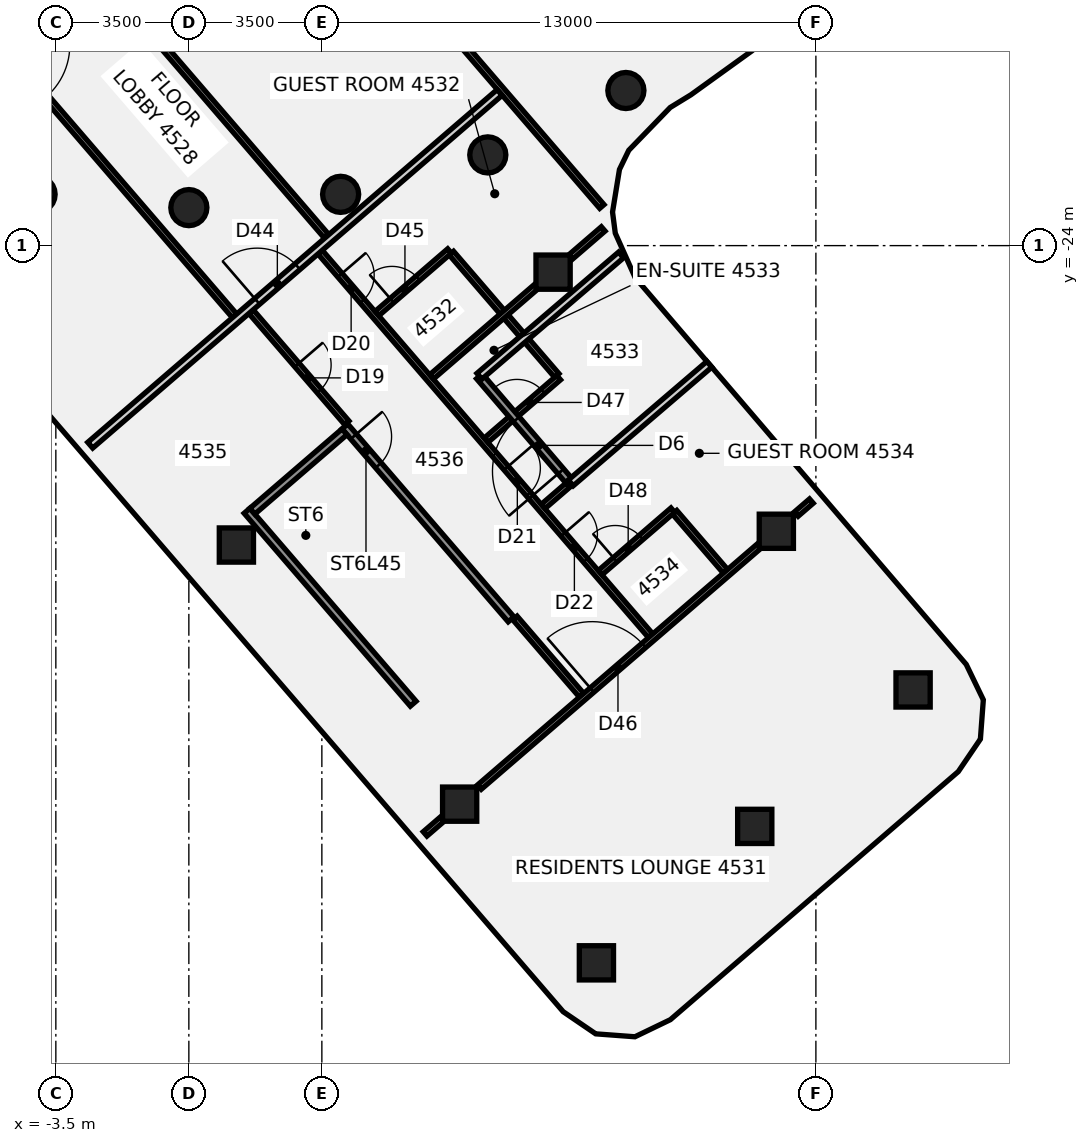
"""IFC4 building model, lengths in metres.
Left out: names, types, materials, properties, quantities, classifications, styles, units other than length and angle.
Written with IfcOpenShell. Run it as: python <this file> out.ifc"""

import sys

from ifc_helpers import new_model, si_unit, direction, frame, frame_2d, origin, origin_2d, place, context, subcontext, project, spatial, polyline, rectangle, circle, outline, extrude, element, fill, save


model = new_model("IFC4")
c1 = context("Model", 3, precision=1e-05, world=origin(), true_north=direction((0.0, 1.0)))
c2 = subcontext(c1, "Body", "Model", "MODEL_VIEW")
j1 = project(units=[si_unit("LENGTHUNIT", "METRE"), si_unit("PLANEANGLEUNIT", "RADIAN")], contexts=[c1])
p1 = place(None, origin())
s1 = spatial("IfcSite", under=j1, at=p1, CompositionType="ELEMENT")
p2 = place(p1, origin())
s2 = spatial("IfcBuilding", under=s1, at=p2, CompositionType="ELEMENT")
p3 = place(p2, frame((0.0, 0.0, 182.5)))
s3 = spatial("IfcBuildingStorey", under=s2, at=p3, CompositionType="ELEMENT", Elevation=182.5)
for number, where, z_axis, x_axis in (
    (1, (-3.994, -22.651, -0.14), (0.0, 0.0, 1.0), (1.0, 0.0, 0.0)),
    (2, (0.0, -23.0, -0.14), (0.0, 0.0, 1.0), (1.0, 0.0, 0.0)),
    (3, (3.994, -22.651, -0.14), (0.0, 0.0, 1.0), (1.0, 0.0, 0.0)),
    (4, (7.866, -21.613, -0.14), (0.0, 0.0, 1.0), (1.0, 0.0, 0.0)),
    (5, (11.5, -19.919, -0.14), (0.0, 0.0, 1.0), (1.0, 0.0, 0.0)),
):
    element("IfcColumn", number, at=place(p3, frame(where, z_axis=z_axis, x_axis=x_axis)), inside=s3, PredefinedType="COLUMN", context=c2, shape_type="SweptSolid", body=[
        extrude(circle(Radius=0.475, at=origin_2d()), origin(), (0.0, 0.0, 1.0), 3.6),
    ])
p4 = place(p3, frame((15.459, -31.516, -0.133), z_axis=(0.047319070379, 0.07839124964, 0.995799034725), x_axis=(-0.755788776181, -0.649009542698, 0.087005398028)))
e6 = element("IfcColumn", 6, at=p4, inside=s3, PredefinedType="COLUMN", context=c2, shape_type="SweptSolid", body=[
    extrude(rectangle(XDim=0.9, YDim=0.9, at=origin_2d()), origin(), (0.0, 0.0, 1.0), 3.606),
])
p5 = place(p3, frame((7.126, -38.696, -0.133), z_axis=(0.083863399406, 0.036686006843, 0.995801720797), x_axis=(-0.651508924479, 0.758162598415, 0.026936883435)))
e7 = element("IfcColumn", 7, at=p5, inside=s3, PredefinedType="COLUMN", context=c2, shape_type="SweptSolid", body=[
    extrude(rectangle(XDim=0.9, YDim=0.9, at=origin_2d()), origin(), (0.0, 0.0, 1.0), 3.607),
])
p6 = place(p3, frame((9.584, -24.698, -0.135), z_axis=(0.013229584391, 0.048576320124, 0.998731855515), x_axis=(-0.757717932984, -0.651247732409, 0.04171240903)))
e8 = element("IfcColumn", 8, at=p6, inside=s3, PredefinedType="COLUMN", context=c2, shape_type="SweptSolid", body=[
    extrude(rectangle(XDim=0.9, YDim=0.9, at=origin_2d()), origin(), (0.0, 0.0, 1.0), 3.599),
])
p7 = place(p3, frame((1.251, -31.878, -0.135), z_axis=(0.049929700814, 0.006783926741, 0.99872969482), x_axis=(-0.652013787216, 0.757710068374, 0.027449472935)))
e9 = element("IfcColumn", 9, at=p7, inside=s3, PredefinedType="COLUMN", context=c2, shape_type="SweptSolid", body=[
    extrude(rectangle(XDim=0.9, YDim=0.9, at=origin_2d()), origin(), (0.0, 0.0, 1.0), 3.599),
])
p8 = place(p3, frame((10.725, -42.871, -0.125), z_axis=(0.05897537844, 0.10577694023, 0.992639483223), x_axis=(-0.75438904644, -0.6465033883, 0.113712512625)))
e10 = element("IfcColumn", 10, at=p8, inside=s3, PredefinedType="COLUMN", context=c2, shape_type="SweptSolid", body=[
    extrude(rectangle(XDim=0.9, YDim=0.9, at=origin_2d()), origin(), (0.0, 0.0, 1.0), 3.61),
])
p9 = place(p3, frame((14.891, -39.281, -0.126), z_axis=(0.040639705862, 0.12637463351, 0.99114976987), x_axis=(-0.755269902041, -0.645550569996, 0.113277697048)))
e11 = element("IfcColumn", 11, at=p9, inside=s3, PredefinedType="COLUMN", context=c2, shape_type="SweptSolid", body=[
    extrude(rectangle(XDim=0.9, YDim=0.9, at=origin_2d()), origin(), (0.0, 0.0, 1.0), 3.616),
])
p10 = place(p3, frame((19.058, -35.691, -0.128), z_axis=(0.022351267372, 0.146831669094, 0.988908935038), x_axis=(-0.756181261603, -0.644567349154, 0.112795531851)))
e12 = element("IfcColumn", 12, at=p10, inside=s3, PredefinedType="COLUMN", context=c2, shape_type="SweptSolid", body=[
    extrude(rectangle(XDim=0.9, YDim=0.9, at=origin_2d()), origin(), (0.0, 0.0, 1.0), 3.626),
])
p11 = place(p3, frame((-10.298, -12.499, 0.0), z_axis=(0.0, 0.0, 1.0), x_axis=(0.652713185698, -0.757605106382, 0.0)))
e13 = element("IfcWall", 13, at=p11, inside=s3, PredefinedType="PARTITIONING", context=c2, shape_type="SweptSolid", body=[
    extrude(rectangle(XDim=17.62, YDim=0.15, at=frame_2d((8.81, 0.0))), origin(), (0.0, 0.0, 1.0), 2.864),
])
p12 = place(p11, frame((8.22, 0.0, 0.0)))
e14 = element("IfcOpeningElement", 14, at=p12, cuts=e13, PredefinedType="OPENING", context=c2, shape_type="SweptSolid", body=[
    extrude(rectangle(XDim=1.8, YDim=2.1, at=frame_2d((0.9, 1.05))), frame((0.0, 0.085, 0.0), z_axis=(0.0, -1.0, 0.0), x_axis=(1.0, 0.0, 0.0)), (0.0, 0.0, 1.0), 0.17),
])
p13 = place(p3, frame((-6.499, -12.006, 0.0), z_axis=(0.0, 0.0, 1.0), x_axis=(0.65272794867, -0.757592387122, 0.0)))
e15 = element("IfcWall", 15, at=p13, inside=s3, PredefinedType="PARTITIONING", context=c2, shape_type="SweptSolid", body=[
    extrude(rectangle(XDim=15.494, YDim=0.15, at=frame_2d((7.747, 0.0))), origin(), (0.0, 0.0, 1.0), 2.864),
])
p14 = place(p13, frame((5.11, 0.0, 0.0)))
e16 = element("IfcOpeningElement", 16, at=p14, cuts=e15, PredefinedType="OPENING", context=c2, shape_type="SweptSolid", body=[
    extrude(rectangle(XDim=0.9, YDim=2.1, at=frame_2d((0.45, 1.05))), frame((0.0, 0.085, 0.0), z_axis=(0.0, -1.0, 0.0), x_axis=(1.0, 0.0, 0.0)), (0.0, 0.0, 1.0), 0.17),
])
p15 = place(p3, frame((1.421, -12.006, 0.0), z_axis=(0.0, 0.0, 1.0), x_axis=(0.652713345428, -0.757604968767, 0.0)))
e17 = element("IfcWall", 17, at=p15, inside=s3, PredefinedType="PARTITIONING", context=c2, shape_type="SweptSolid", body=[
    extrude(rectangle(XDim=14.473, YDim=0.15, at=frame_2d((7.236, 0.0))), origin(), (0.0, 0.0, 1.0), 2.864),
])
p16 = place(p3, frame((1.636, -25.738, 0.0), z_axis=(0.0, 0.0, 1.0), x_axis=(0.652804508679, -0.757526417657, 0.0)))
e18 = element("IfcWall", 18, at=p16, inside=s3, PredefinedType="PARTITIONING", context=c2, shape_type="SweptSolid", body=[
    extrude(rectangle(XDim=3.861, YDim=0.15, at=frame_2d((1.93, 0.0))), origin(), (0.0, 0.0, 1.0), 2.864),
])
p17 = place(p16, frame((1.85, 0.0, 0.0)))
e19 = element("IfcOpeningElement", 19, at=p17, cuts=e18, PredefinedType="OPENING", context=c2, shape_type="SweptSolid", body=[
    extrude(rectangle(XDim=0.9, YDim=2.1, at=frame_2d((0.45, 1.05))), frame((0.0, 0.085, 0.0), z_axis=(0.0, -1.0, 0.0), x_axis=(1.0, 0.0, 0.0)), (0.0, 0.0, 1.0), 0.17),
])
p18 = place(p3, frame((8.582, -33.798, 0.0), z_axis=(0.0, 0.0, 1.0), x_axis=(0.652799090174, -0.757531087063, 0.0)))
e20 = element("IfcWall", 20, at=p18, inside=s3, PredefinedType="PARTITIONING", context=c2, shape_type="SweptSolid", body=[
    extrude(rectangle(XDim=2.681, YDim=0.15, at=frame_2d((1.34, 0.0))), origin(), (0.0, 0.0, 1.0), 2.864),
])
p19 = place(p3, frame((3.454, -24.172, 0.0), z_axis=(0.0, 0.0, 1.0), x_axis=(0.652748517357, -0.757574665025, 0.0)))
e21 = element("IfcWall", 21, at=p19, inside=s3, PredefinedType="PARTITIONING", context=c2, shape_type="SweptSolid", body=[
    extrude(rectangle(XDim=13.32, YDim=0.15, at=frame_2d((6.66, 0.0))), origin(), (0.0, 0.0, 1.0), 2.864),
])
p20 = place(p19, frame((0.8, 0.0, 0.0)))
e22 = element("IfcOpeningElement", 22, at=p20, cuts=e21, PredefinedType="OPENING", context=c2, shape_type="SweptSolid", body=[
    extrude(rectangle(XDim=0.9, YDim=2.1, at=frame_2d((0.45, 1.05))), frame((0.0, 0.085, 0.0), z_axis=(0.0, -1.0, 0.0), x_axis=(1.0, 0.0, 0.0)), (0.0, 0.0, 1.0), 0.17),
])
p21 = place(p19, frame((7.5, 0.0, 0.0)))
e23 = element("IfcOpeningElement", 23, at=p21, cuts=e21, PredefinedType="OPENING", context=c2, shape_type="SweptSolid", body=[
    extrude(rectangle(XDim=0.9, YDim=2.1, at=frame_2d((0.45, 1.05))), frame((0.0, 0.085, 0.0), z_axis=(0.0, -1.0, 0.0), x_axis=(1.0, 0.0, 0.0)), (0.0, 0.0, 1.0), 0.17),
])
p22 = place(p19, frame((9.8, 0.0, 0.0)))
e24 = element("IfcOpeningElement", 24, at=p22, cuts=e21, PredefinedType="OPENING", context=c2, shape_type="SweptSolid", body=[
    extrude(rectangle(XDim=0.9, YDim=2.1, at=frame_2d((0.45, 1.05))), frame((0.0, 0.085, 0.0), z_axis=(0.0, -1.0, 0.0), x_axis=(1.0, 0.0, 0.0)), (0.0, 0.0, 1.0), 0.17),
])
p23 = place(p3, frame((6.909, -24.198, 0.0), z_axis=(0.0, 0.0, 1.0), x_axis=(0.652677065628, -0.757636224057, 0.0)))
e25 = element("IfcWall", 25, at=p23, inside=s3, PredefinedType="PARTITIONING", context=c2, shape_type="SweptSolid", body=[
    extrude(rectangle(XDim=4.25, YDim=0.15, at=frame_2d((2.125, 0.0))), origin(), (0.0, 0.0, 1.0), 2.864),
])
p24 = place(p3, frame((12.783, -31.017, 0.0), z_axis=(0.0, 0.0, 1.0), x_axis=(0.652637354116, -0.75767043232, 0.0)))
e26 = element("IfcWall", 26, at=p24, inside=s3, PredefinedType="PARTITIONING", context=c2, shape_type="SweptSolid", body=[
    extrude(rectangle(XDim=2.045, YDim=0.15, at=frame_2d((1.023, 0.0))), origin(), (0.0, 0.0, 1.0), 2.864),
])
p25 = place(p3, frame((-2.595, -29.251, 0.0), z_axis=(0.0, 0.0, 1.0), x_axis=(0.757604641141, 0.652713725704, 0.0)))
e27 = element("IfcWall", 27, at=p25, inside=s3, PredefinedType="PARTITIONING", context=c2, shape_type="SweptSolid", body=[
    extrude(rectangle(XDim=14.219, YDim=0.2, at=frame_2d((7.109, 0.0))), origin(), (0.0, 0.0, 1.0), 2.864),
])
p26 = place(p25, frame((5.799, 0.0, 0.0)))
e28 = element("IfcOpeningElement", 28, at=p26, cuts=e27, PredefinedType="OPENING", context=c2, shape_type="SweptSolid", body=[
    extrude(rectangle(XDim=1.4, YDim=2.1, at=frame_2d((0.7, 1.05))), frame((0.0, 0.11, 0.0), z_axis=(0.0, -1.0, 0.0), x_axis=(1.0, 0.0, 0.0)), (0.0, 0.0, 1.0), 0.22),
])
p27 = place(p3, frame((4.952, -25.786, 0.0), z_axis=(0.0, 0.0, 1.0), x_axis=(0.757495885979, 0.652839936528, 0.0)))
e29 = element("IfcWall", 29, at=p27, inside=s3, PredefinedType="PARTITIONING", context=c2, shape_type="SweptSolid", body=[
    extrude(rectangle(XDim=2.52, YDim=0.15, at=frame_2d((1.26, 0.0))), origin(), (0.0, 0.0, 1.0), 2.864),
])
p28 = place(p27, frame((0.52, 0.0, 0.0)))
e30 = element("IfcOpeningElement", 30, at=p28, cuts=e29, PredefinedType="OPENING", context=c2, shape_type="SweptSolid", body=[
    extrude(rectangle(XDim=0.9, YDim=2.1, at=frame_2d((0.45, 1.05))), frame((0.0, 0.085, 0.0), z_axis=(0.0, -1.0, 0.0), x_axis=(1.0, 0.0, 0.0)), (0.0, 0.0, 1.0), 0.17),
])
p29 = place(p3, frame((6.217, -39.479, 0.0), z_axis=(0.0, 0.0, 1.0), x_axis=(0.757658475541, 0.652651234918, 0.0)))
e31 = element("IfcWall", 31, at=p29, inside=s3, PredefinedType="PARTITIONING", context=c2, shape_type="SweptSolid", body=[
    extrude(rectangle(XDim=0.821, YDim=0.15, at=frame_2d((0.41, 0.0))), origin(), (0.0, 0.0, 1.0), 2.864),
])
p30 = place(p3, frame((7.646, -38.248, 0.0), z_axis=(0.0, 0.0, 1.0), x_axis=(0.757593369708, 0.652726808224, 0.0)))
e32 = element("IfcWall", 32, at=p30, inside=s3, PredefinedType="PARTITIONING", context=c2, shape_type="SweptSolid", body=[
    extrude(rectangle(XDim=9.941, YDim=0.15, at=frame_2d((4.97, 0.0))), origin(), (0.0, 0.0, 1.0), 2.864),
])
p31 = place(p30, frame((3.913, 0.0, 0.0)))
e33 = element("IfcOpeningElement", 33, at=p31, cuts=e32, PredefinedType="OPENING", context=c2, shape_type="SweptSolid", body=[
    extrude(rectangle(XDim=1.8, YDim=2.1, at=frame_2d((0.9, 1.05))), frame((0.0, 0.085, 0.0), z_axis=(0.0, -1.0, 0.0), x_axis=(1.0, 0.0, 0.0)), (0.0, 0.0, 1.0), 0.17),
])
p32 = place(p3, frame((15.985, -31.063, 0.0), z_axis=(0.0, 0.0, 1.0), x_axis=(0.757409961601, 0.652939622069, 0.0)))
e34 = element("IfcWall", 34, at=p32, inside=s3, PredefinedType="PARTITIONING", context=c2, shape_type="SweptSolid", body=[
    extrude(rectangle(XDim=0.523, YDim=0.15, at=frame_2d((0.262, 0.0))), origin(), (0.0, 0.0, 1.0), 2.864),
])
p33 = place(p3, frame((6.388, -27.453, 0.0), z_axis=(0.0, 0.0, 1.0), x_axis=(0.757450861075, 0.652892175674, 0.0)))
e35 = element("IfcWall", 35, at=p33, inside=s3, PredefinedType="PARTITIONING", context=c2, shape_type="SweptSolid", body=[
    extrude(rectangle(XDim=3.766, YDim=0.15, at=frame_2d((1.883, 0.0))), origin(), (0.0, 0.0, 1.0), 2.864),
])
p34 = place(p3, frame((10.048, -24.299, 0.0), z_axis=(0.0, 0.0, 1.0), x_axis=(0.75736205632, 0.652995188074, 0.0)))
e36 = element("IfcWall", 36, at=p34, inside=s3, PredefinedType="PARTITIONING", context=c2, shape_type="SweptSolid", body=[
    extrude(rectangle(XDim=1.13, YDim=0.15, at=frame_2d((0.565, 0.0))), origin(), (0.0, 0.0, 1.0), 2.864),
])
p35 = place(p3, frame((7.823, -29.119, 0.0), z_axis=(0.0, 0.0, 1.0), x_axis=(0.757495885979, 0.652839936528, 0.0)))
e37 = element("IfcWall", 37, at=p35, inside=s3, PredefinedType="PARTITIONING", context=c2, shape_type="SweptSolid", body=[
    extrude(rectangle(XDim=2.52, YDim=0.15, at=frame_2d((1.26, 0.0))), origin(), (0.0, 0.0, 1.0), 2.864),
])
p36 = place(p35, frame((1.07, 0.0, 0.0)))
e38 = element("IfcOpeningElement", 38, at=p36, cuts=e37, PredefinedType="OPENING", context=c2, shape_type="SweptSolid", body=[
    extrude(rectangle(XDim=0.9, YDim=2.1, at=frame_2d((0.45, 1.05))), frame((0.0, 0.085, 0.0), z_axis=(0.0, -1.0, 0.0), x_axis=(1.0, 0.0, 0.0)), (0.0, 0.0, 1.0), 0.17),
])
p37 = place(p3, frame((9.325, -30.862, 0.0), z_axis=(0.0, 0.0, 1.0), x_axis=(0.757576004925, 0.652746962277, 0.0)))
e39 = element("IfcWall", 39, at=p37, inside=s3, PredefinedType="PARTITIONING", context=c2, shape_type="SweptSolid", body=[
    extrude(rectangle(XDim=0.852, YDim=0.15, at=frame_2d((0.426, 0.0))), origin(), (0.0, 0.0, 1.0), 2.864),
])
p38 = place(p3, frame((10.826, -32.604, 0.0), z_axis=(0.0, 0.0, 1.0), x_axis=(0.757661014591, 0.652648287341, 0.0)))
e40 = element("IfcWall", 40, at=p38, inside=s3, PredefinedType="PARTITIONING", context=c2, shape_type="SweptSolid", body=[
    extrude(rectangle(XDim=2.52, YDim=0.15, at=frame_2d((1.26, 0.0))), origin(), (0.0, 0.0, 1.0), 2.864),
])
p39 = place(p38, frame((0.52, 0.0, 0.0)))
e41 = element("IfcOpeningElement", 41, at=p39, cuts=e40, PredefinedType="OPENING", context=c2, shape_type="SweptSolid", body=[
    extrude(rectangle(XDim=0.9, YDim=2.1, at=frame_2d((0.45, 1.05))), frame((0.0, 0.085, 0.0), z_axis=(0.0, -1.0, 0.0), x_axis=(1.0, 0.0, 0.0)), (0.0, 0.0, 1.0), 0.17),
])
p40 = place(p3, frame((10.049, -30.244, 0.0), z_axis=(0.0, 0.0, 1.0), x_axis=(-0.650312392962, 0.759666895132, 0.0)))
e42 = element("IfcWall", 42, at=p40, inside=s3, PredefinedType="SOLIDWALL", context=c2, shape_type="SweptSolid", body=[
    extrude(rectangle(XDim=3.695, YDim=0.2, at=frame_2d((1.847, 0.0))), origin(), (0.0, 0.0, 1.0), 3.014),
])
p41 = place(p40, frame((0.4, 0.0, 0.0)))
e43 = element("IfcOpeningElement", 43, at=p41, cuts=e42, PredefinedType="OPENING", context=c2, shape_type="SweptSolid", body=[
    extrude(rectangle(XDim=1.8, YDim=2.4, at=frame_2d((0.9, 1.2))), frame((0.0, 0.11, 0.0), z_axis=(0.0, -1.0, 0.0), x_axis=(1.0, 0.0, 0.0)), (0.0, 0.0, 1.0), 0.22),
])
p42 = place(p3, frame((10.049, -30.244, 0.0), z_axis=(0.0, 0.0, 1.0), x_axis=(0.759644225887, 0.650338873263, 0.0)))
e44 = element("IfcWall", 44, at=p42, inside=s3, PredefinedType="SOLIDWALL", context=c2, shape_type="SweptSolid", body=[
    extrude(rectangle(XDim=4.8, YDim=0.2, at=frame_2d((2.4, 0.0))), origin(), (0.0, 0.0, 1.0), 3.014),
])
p43 = place(p3, frame((7.646, -27.437, 0.0), z_axis=(0.0, 0.0, 1.0), x_axis=(0.759635869727, 0.650348633752, 0.0)))
e45 = element("IfcWall", 45, at=p43, inside=s3, PredefinedType="SOLIDWALL", context=c2, shape_type="SweptSolid", body=[
    extrude(rectangle(XDim=4.906, YDim=0.2, at=frame_2d((2.453, 0.0))), origin(), (0.0, 0.0, 1.0), 3.014),
])
p44 = place(p3, frame((4.106, -28.758, -0.14), z_axis=(0.0, 0.0, 1.0), x_axis=(0.652703877257, -0.757613125952, 0.0)))
e46 = element("IfcWall", 46, at=p44, inside=s3, PredefinedType="SHEAR", context=c2, shape_type="SweptSolid", body=[
    extrude(rectangle(XDim=6.7, YDim=0.2, at=frame_2d((3.35, 0.0))), origin(), (0.0, 0.0, 1.0), 3.004),
])
p45 = place(p44, frame((0.35, 0.0, 0.0)))
e47 = element("IfcOpeningElement", 47, at=p45, cuts=e46, PredefinedType="OPENING", context=c2, shape_type="SweptSolid", body=[
    extrude(rectangle(XDim=1.0, YDim=2.1, at=frame_2d((0.5, 1.05))), frame((0.0, 0.11, 0.0), z_axis=(0.0, -1.0, 0.0), x_axis=(1.0, 0.0, 0.0)), (0.0, 0.0, 1.0), 0.22),
])
p46 = place(p3, frame((1.531, -30.977, -0.14), z_axis=(0.0, 0.0, 1.0), x_axis=(0.652724791955, -0.757595106879, 0.0)))
e48 = element("IfcWall", 48, at=p46, inside=s3, PredefinedType="SHEAR", context=c2, shape_type="SweptSolid", body=[
    extrude(rectangle(XDim=6.7, YDim=0.2, at=frame_2d((3.35, 0.0))), origin(), (0.0, 0.0, 1.0), 3.004),
])
p47 = place(p3, frame((1.672, -30.988, -0.14), z_axis=(0.0, 0.0, 1.0), x_axis=(0.75757386542, 0.652749445371, 0.0)))
e49 = element("IfcWall", 49, at=p47, inside=s3, PredefinedType="SHEAR", context=c2, shape_type="SweptSolid", body=[
    extrude(rectangle(XDim=3.2, YDim=0.2, at=frame_2d((1.6, 0.0))), origin(), (0.0, 0.0, 1.0), 3.004),
])
p48 = place(p3, frame((0.0, 0.0, -0.14)))
e50 = element("IfcWall", 50, at=p48, inside=s3, PredefinedType="SHEAR", context=c2, shape_type="SweptSolid", body=[
    extrude(outline(polyline([(5.849, -35.836), (5.979, -35.988), (8.404, -33.899), (8.273, -33.747), (5.849, -35.836)])), origin(), (0.0, 0.0, 1.0), 3.004),
])
p49 = place(p17, frame((0.9, 0.0, 0.0), z_axis=(0.0, 0.0, 1.0), x_axis=(-1.0, 0.0, 0.0)))
e51 = element("IfcDoor", 51, at=p49, inside=s3, OperationType="SINGLE_SWING_RIGHT", PredefinedType="DOOR", context=c2, shape_type="SweptSolid", body=[
    extrude(rectangle(XDim=0.9, YDim=2.1, at=frame_2d((0.45, 1.05))), frame((0.0, 0.025, 0.0), z_axis=(0.0, -1.0, 0.0), x_axis=(1.0, 0.0, 0.0)), (0.0, 0.0, 1.0), 0.05),
])
fill(e19, e51)
p50 = place(p20, origin())
e52 = element("IfcDoor", 52, at=p50, inside=s3, OperationType="SINGLE_SWING_RIGHT", PredefinedType="DOOR", context=c2, shape_type="SweptSolid", body=[
    extrude(rectangle(XDim=0.9, YDim=2.1, at=frame_2d((0.45, 1.05))), frame((0.0, 0.025, 0.0), z_axis=(0.0, -1.0, 0.0), x_axis=(1.0, 0.0, 0.0)), (0.0, 0.0, 1.0), 0.05),
])
fill(e22, e52)
p51 = place(p21, origin())
e53 = element("IfcDoor", 53, at=p51, inside=s3, OperationType="SINGLE_SWING_LEFT", PredefinedType="DOOR", context=c2, shape_type="SweptSolid", body=[
    extrude(rectangle(XDim=0.9, YDim=2.1, at=frame_2d((0.45, 1.05))), frame((0.0, 0.025, 0.0), z_axis=(0.0, -1.0, 0.0), x_axis=(1.0, 0.0, 0.0)), (0.0, 0.0, 1.0), 0.05),
])
fill(e23, e53)
p52 = place(p22, origin())
e54 = element("IfcDoor", 54, at=p52, inside=s3, OperationType="SINGLE_SWING_LEFT", PredefinedType="DOOR", context=c2, shape_type="SweptSolid", body=[
    extrude(rectangle(XDim=0.9, YDim=2.1, at=frame_2d((0.45, 1.05))), frame((0.0, 0.025, 0.0), z_axis=(0.0, -1.0, 0.0), x_axis=(1.0, 0.0, 0.0)), (0.0, 0.0, 1.0), 0.05),
])
fill(e24, e54)
p53 = place(p26, origin())
e55 = element("IfcDoor", 55, at=p53, inside=s3, OperationType="DOUBLE_DOOR_SINGLE_SWING", PredefinedType="DOOR", context=c2, shape_type="SweptSolid", body=[
    extrude(rectangle(XDim=1.4, YDim=2.1, at=frame_2d((0.7, 1.05))), frame((0.0, 0.025, 0.0), z_axis=(0.0, -1.0, 0.0), x_axis=(1.0, 0.0, 0.0)), (0.0, 0.0, 1.0), 0.05),
])
fill(e28, e55)
p54 = place(p28, frame((0.9, 0.0, 0.0), z_axis=(0.0, 0.0, 1.0), x_axis=(-1.0, 0.0, 0.0)))
e56 = element("IfcDoor", 56, at=p54, inside=s3, OperationType="SINGLE_SWING_LEFT", PredefinedType="DOOR", context=c2, shape_type="SweptSolid", body=[
    extrude(rectangle(XDim=0.9, YDim=2.1, at=frame_2d((0.45, 1.05))), frame((0.0, 0.025, 0.0), z_axis=(0.0, -1.0, 0.0), x_axis=(1.0, 0.0, 0.0)), (0.0, 0.0, 1.0), 0.05),
])
fill(e30, e56)
p55 = place(p31, frame((1.8, 0.0, 0.0), z_axis=(0.0, 0.0, 1.0), x_axis=(-1.0, 0.0, 0.0)))
e57 = element("IfcDoor", 57, at=p55, inside=s3, OperationType="DOUBLE_DOOR_SINGLE_SWING", PredefinedType="DOOR", context=c2, shape_type="SweptSolid", body=[
    extrude(rectangle(XDim=1.8, YDim=2.1, at=frame_2d((0.9, 1.05))), frame((0.0, 0.025, 0.0), z_axis=(0.0, -1.0, 0.0), x_axis=(1.0, 0.0, 0.0)), (0.0, 0.0, 1.0), 0.05),
])
fill(e33, e57)
p56 = place(p36, origin())
e58 = element("IfcDoor", 58, at=p56, inside=s3, OperationType="SINGLE_SWING_RIGHT", PredefinedType="DOOR", context=c2, shape_type="SweptSolid", body=[
    extrude(rectangle(XDim=0.9, YDim=2.1, at=frame_2d((0.45, 1.05))), frame((0.0, 0.025, 0.0), z_axis=(0.0, -1.0, 0.0), x_axis=(1.0, 0.0, 0.0)), (0.0, 0.0, 1.0), 0.05),
])
fill(e38, e58)
p57 = place(p39, frame((0.9, 0.0, 0.0), z_axis=(0.0, 0.0, 1.0), x_axis=(-1.0, 0.0, 0.0)))
e59 = element("IfcDoor", 59, at=p57, inside=s3, OperationType="SINGLE_SWING_LEFT", PredefinedType="DOOR", context=c2, shape_type="SweptSolid", body=[
    extrude(rectangle(XDim=0.9, YDim=2.1, at=frame_2d((0.45, 1.05))), frame((0.0, 0.025, 0.0), z_axis=(0.0, -1.0, 0.0), x_axis=(1.0, 0.0, 0.0)), (0.0, 0.0, 1.0), 0.05),
])
fill(e41, e59)
p58 = place(p41, origin())
e60 = element("IfcDoor", 60, at=p58, inside=s3, OperationType="SINGLE_SWING_LEFT", PredefinedType="DOOR", context=c2, shape_type="SweptSolid", body=[
    extrude(rectangle(XDim=1.8, YDim=2.4, at=frame_2d((0.9, 1.2))), frame((0.0, 0.025, 0.0), z_axis=(0.0, -1.0, 0.0), x_axis=(1.0, 0.0, 0.0)), (0.0, 0.0, 1.0), 0.05),
])
fill(e43, e60)
p59 = place(p45, origin())
e61 = element("IfcDoor", 61, at=p59, inside=s3, OperationType="SINGLE_SWING_LEFT", PredefinedType="DOOR", context=c2, shape_type="SweptSolid", body=[
    extrude(rectangle(XDim=1.0, YDim=2.1, at=frame_2d((0.5, 1.05))), frame((0.0, 0.025, 0.0), z_axis=(0.0, -1.0, 0.0), x_axis=(1.0, 0.0, 0.0)), (0.0, 0.0, 1.0), 0.05),
])
fill(e47, e61)
save(model, sys.argv[1])
